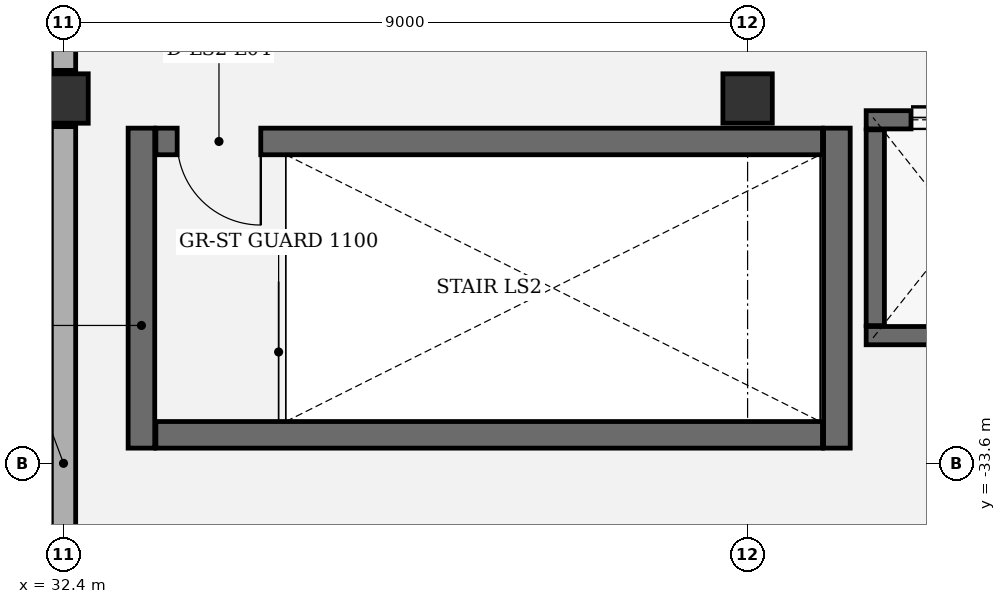
"""IFC4 building model, lengths in metres.
Left out: names, types, materials, properties, quantities, classifications, styles, units other than length and angle.
Written with IfcOpenShell. Run it as: python <this file> out.ifc"""

import sys

from ifc_helpers import new_model, si_unit, direction, frame, frame_2d, origin, origin_2d, place, context, subcontext, project, spatial, rectangle, extrude, element, fill, save


model = new_model("IFC4")
c1 = context("Model", 3, precision=1e-05, world=origin(), true_north=direction((0.0, 1.0)))
c2 = subcontext(c1, "Body", "Model", "MODEL_VIEW")
j1 = project(units=[si_unit("LENGTHUNIT", "METRE"), si_unit("PLANEANGLEUNIT", "RADIAN")], contexts=[c1])
p1 = place(None, origin())
s1 = spatial("IfcSite", under=j1, at=p1, CompositionType="ELEMENT")
p2 = place(p1, origin())
s2 = spatial("IfcBuilding", under=s1, at=p2, CompositionType="ELEMENT")
p3 = place(p2, frame((0.0, 0.0, 22.0)))
s3 = spatial("IfcBuildingStorey", under=s2, at=p3, CompositionType="ELEMENT", Elevation=22.0)
for number, where, z_axis, x_axis in (
    (1, (32.4, -28.8, 0.0), (0.0, 0.0, 1.0), (1.0, 0.0, 0.0)),
    (2, (41.4, -28.8, 0.0), (0.0, 0.0, 1.0), (1.0, 0.0, 0.0)),
):
    element("IfcColumn", number, at=place(p3, frame(where, z_axis=z_axis, x_axis=x_axis)), inside=s3, PredefinedType="COLUMN", context=c2, shape_type="SweptSolid", body=[
        extrude(rectangle(XDim=0.65, YDim=0.65, at=origin_2d()), origin(), (0.0, 0.0, 1.0), 7.094),
    ])
p4 = place(p3, frame((32.4, -38.03, 0.0), z_axis=(0.0, 0.0, 1.0), x_axis=(0.0, 1.0, 0.0)))
e3 = element("IfcWall", 3, at=p4, inside=s3, PredefinedType="SOLIDWALL", context=c2, shape_type="SweptSolid", body=[
    extrude(rectangle(XDim=8.86, YDim=0.32, at=frame_2d((4.43, 0.0))), origin(), (0.0, 0.0, 1.0), 4.7),
])
p5 = place(p3, frame((32.4, -28.43, 0.0), z_axis=(0.0, 0.0, 1.0), x_axis=(0.0, 1.0, 0.0)))
e4 = element("IfcWall", 4, at=p5, inside=s3, PredefinedType="SOLIDWALL", context=c2, shape_type="SweptSolid", body=[
    extrude(rectangle(XDim=8.86, YDim=0.32, at=frame_2d((4.43, 0.0))), origin(), (0.0, 0.0, 1.0), 4.7),
])
for number, where, z_axis, x_axis in (
    (5, (33.425, -29.19, 0.0), (0.0, 0.0, 1.0), (0.0, -1.0, 0.0)),
    (6, (42.575, -33.4, 0.0), (0.0, 0.0, 1.0), (0.0, 1.0, 0.0)),
):
    element("IfcWall", number, at=place(p3, frame(where, z_axis=z_axis, x_axis=x_axis)), inside=s3, PredefinedType="SHEAR", context=c2, shape_type="SweptSolid", body=[
        extrude(rectangle(XDim=4.21, YDim=0.35, at=frame_2d((2.105, 0.0))), origin(), (0.0, 0.0, 1.0), 4.75),
    ])
p6 = place(p3, frame((33.615, -33.225, 0.0), z_axis=(0.0, 0.0, 1.0), x_axis=(1.0, 0.0, 0.0)))
e7 = element("IfcWall", 7, at=p6, inside=s3, PredefinedType="SHEAR", context=c2, shape_type="SweptSolid", body=[
    extrude(rectangle(XDim=8.77, YDim=0.35, at=frame_2d((4.385, 0.0))), origin(), (0.0, 0.0, 1.0), 4.75),
])
p7 = place(p3, frame((42.385, -29.365, 0.0), z_axis=(0.0, 0.0, 1.0), x_axis=(-1.0, 0.0, 0.0)))
e8 = element("IfcWall", 8, at=p7, inside=s3, PredefinedType="SHEAR", context=c2, shape_type="SweptSolid", body=[
    extrude(rectangle(XDim=8.77, YDim=0.35, at=frame_2d((4.385, 0.0))), origin(), (0.0, 0.0, 1.0), 4.75),
])
p8 = place(p7, frame((7.39, 0.0, 0.0)))
e9 = element("IfcOpeningElement", 9, at=p8, cuts=e8, PredefinedType="OPENING", context=c2, shape_type="SweptSolid", body=[
    extrude(rectangle(XDim=1.1, YDim=2.2, at=frame_2d((0.55, 1.1))), frame((0.0, 0.185, 0.0), z_axis=(0.0, -1.0, 0.0), x_axis=(1.0, 0.0, 0.0)), (0.0, 0.0, 1.0), 0.37),
])
p9 = place(p3, frame((45.44, -31.92, 0.0), z_axis=(0.0, 0.0, 1.0), x_axis=(-1.0, 0.0, 0.0)))
e10 = element("IfcWall", 10, at=p9, inside=s3, PredefinedType="SHEAR", context=c2, shape_type="SweptSolid", body=[
    extrude(rectangle(XDim=2.48, YDim=0.24, at=frame_2d((1.24, 0.0))), origin(), (0.0, 0.0, 1.0), 4.75),
])
p10 = place(p3, frame((42.96, -29.08, 0.0), z_axis=(0.0, 0.0, 1.0), x_axis=(1.0, 0.0, 0.0)))
e11 = element("IfcWall", 11, at=p10, inside=s3, PredefinedType="SHEAR", context=c2, shape_type="SweptSolid", body=[
    extrude(rectangle(XDim=2.48, YDim=0.24, at=frame_2d((1.24, 0.0))), origin(), (0.0, 0.0, 1.0), 4.75),
])
p11 = place(p10, frame((0.59, 0.0, 0.0)))
e12 = element("IfcOpeningElement", 12, at=p11, cuts=e11, PredefinedType="OPENING", context=c2, shape_type="SweptSolid", body=[
    extrude(rectangle(XDim=1.3, YDim=2.3, at=frame_2d((0.65, 1.15))), frame((0.0, 0.13, 0.0), z_axis=(0.0, -1.0, 0.0), x_axis=(1.0, 0.0, 0.0)), (0.0, 0.0, 1.0), 0.26),
])
p12 = place(p3, frame((43.08, -31.788, 0.0), z_axis=(0.0, 0.0, 1.0), x_axis=(0.0, 1.0, 0.0)))
e13 = element("IfcWall", 13, at=p12, inside=s3, PredefinedType="SHEAR", context=c2, shape_type="SweptSolid", body=[
    extrude(rectangle(XDim=2.576, YDim=0.24, at=frame_2d((1.288, 0.0))), origin(), (0.0, 0.0, 1.0), 4.75),
])
p13 = place(p8, origin())
e14 = element("IfcDoor", 14, at=p13, inside=s3, OperationType="SINGLE_SWING_LEFT", PredefinedType="DOOR", context=c2, shape_type="SweptSolid", body=[
    extrude(rectangle(XDim=1.1, YDim=2.2, at=frame_2d((0.55, 1.1))), frame((0.0, 0.025, 0.0), z_axis=(0.0, -1.0, 0.0), x_axis=(1.0, 0.0, 0.0)), (0.0, 0.0, 1.0), 0.05),
])
fill(e9, e14)
p14 = place(p11, origin())
e15 = element("IfcDoor", 15, at=p14, inside=s3, OperationType="DOUBLE_DOOR_SLIDING", PredefinedType="DOOR", context=c2, shape_type="SweptSolid", body=[
    extrude(rectangle(XDim=1.3, YDim=2.3, at=frame_2d((0.65, 1.15))), frame((0.0, 0.025, 0.0), z_axis=(0.0, -1.0, 0.0), x_axis=(1.0, 0.0, 0.0)), (0.0, 0.0, 1.0), 0.05),
])
fill(e12, e15)
save(model, sys.argv[1])
